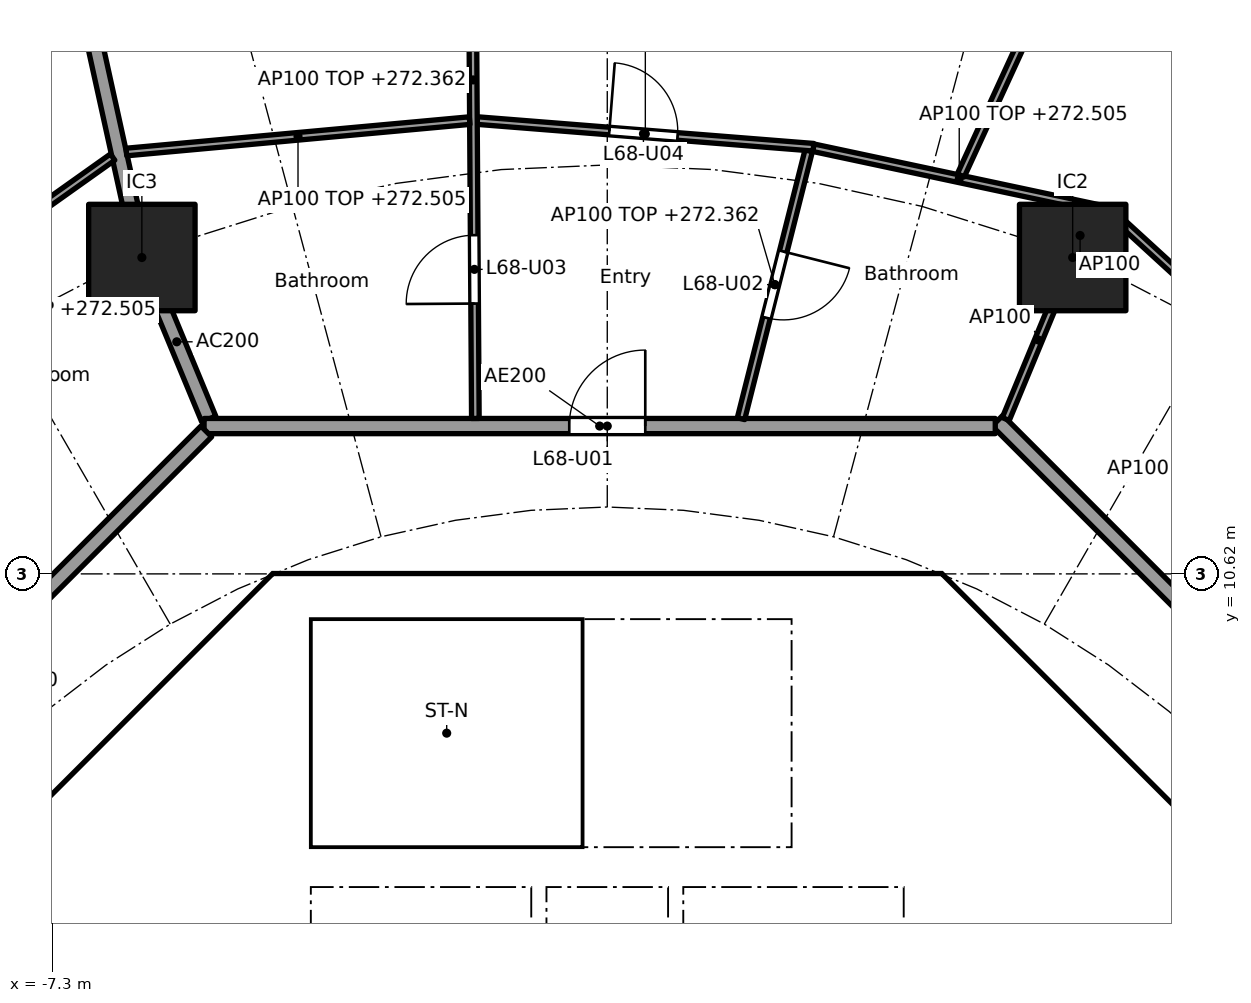
"""IFC4 building model, lengths in metres.
Left out: names, types, materials, properties, quantities, classifications, styles, units other than length and angle.
Written with IfcOpenShell. Run it as: python <this file> out.ifc"""

import sys

from ifc_helpers import new_model, si_unit, direction, frame, frame_2d, origin, origin_2d, place, context, subcontext, project, spatial, polyline, rectangle, outline, extrude, element, fill, save


model = new_model("IFC4")
c1 = context("Model", 3, precision=1e-05, world=origin(), true_north=direction((0.0, 1.0)))
c2 = subcontext(c1, "Body", "Model", "MODEL_VIEW")
j1 = project(units=[si_unit("LENGTHUNIT", "METRE"), si_unit("PLANEANGLEUNIT", "RADIAN")], contexts=[c1])
p1 = place(None, origin())
s1 = spatial("IfcSite", under=j1, at=p1, CompositionType="ELEMENT")
p2 = place(p1, origin())
s2 = spatial("IfcBuilding", under=s1, at=p2, CompositionType="ELEMENT")
p3 = place(p2, frame((0.0, 0.0, 269.6)))
s3 = spatial("IfcBuildingStorey", under=s2, at=p3, CompositionType="ELEMENT", Elevation=269.6)
for number, where, z_axis, x_axis in (
    (1, (6.123, 14.782, 0.0), (0.0, 0.0, 1.0), (1.0, 0.0, 0.0)),
    (2, (-6.123, 14.782, 0.0), (0.0, 0.0, 1.0), (1.0, 0.0, 0.0)),
):
    element("IfcColumn", number, at=place(p3, frame(where, z_axis=z_axis, x_axis=x_axis)), inside=s3, PredefinedType="COLUMN", context=c2, shape_type="SweptSolid", body=[
        extrude(rectangle(XDim=1.4, YDim=1.4, at=origin_2d()), origin(), (0.0, 0.0, 1.0), 3.7),
    ])
p4 = place(p3, frame((9.988, 4.613, 0.0), z_axis=(0.0, 0.0, 1.0), x_axis=(-0.707106781187, 0.707106781187, 0.0)))
e3 = element("IfcWall", 3, at=p4, inside=s3, PredefinedType="SHEAR", context=c2, shape_type="SweptSolid", body=[
    extrude(rectangle(XDim=7.602, YDim=0.6, at=frame_2d((3.801, 0.0))), origin(), (0.0, 0.0, 1.0), 3.44),
])
p5 = place(p4, frame((3.201, 0.0, 0.0)))
e4 = element("IfcOpeningElement", 4, at=p5, cuts=e3, PredefinedType="OPENING", context=c2, shape_type="SweptSolid", body=[
    extrude(rectangle(XDim=1.2, YDim=2.1, at=frame_2d((0.6, 1.05))), frame((0.0, 0.31, 0.0), z_axis=(0.0, -1.0, 0.0), x_axis=(1.0, 0.0, 0.0)), (0.0, 0.0, 1.0), 0.62),
])
p6 = place(p3, frame((-4.613, 9.988, 0.0), z_axis=(0.0, 0.0, 1.0), x_axis=(-0.707106781187, -0.707106781187, 0.0)))
e5 = element("IfcWall", 5, at=p6, inside=s3, PredefinedType="SHEAR", context=c2, shape_type="SweptSolid", body=[
    extrude(rectangle(XDim=7.602, YDim=0.6, at=frame_2d((3.801, 0.0))), origin(), (0.0, 0.0, 1.0), 3.44),
])
p7 = place(p6, frame((0.351, 0.0, 0.0)))
e6 = element("IfcOpeningElement", 6, at=p7, cuts=e5, PredefinedType="OPENING", context=c2, shape_type="SweptSolid", body=[
    extrude(rectangle(XDim=1.1, YDim=2.1, at=frame_2d((0.55, 1.05))), frame((0.0, 0.31, 0.0), z_axis=(0.0, -1.0, 0.0), x_axis=(1.0, 0.0, 0.0)), (0.0, 0.0, 1.0), 0.62),
])
p8 = place(p3, frame((-5.8, 4.3, 0.0), z_axis=(0.0, 0.0, 1.0), x_axis=(0.0, 1.0, 0.0)))
e7 = element("IfcWall", 7, at=p8, inside=s3, PredefinedType="PARTITIONING", context=c2, shape_type="SweptSolid", body=[
    extrude(rectangle(XDim=3.927, YDim=0.15, at=frame_2d((1.963, 0.0))), origin(), (0.0, 0.0, 1.0), 3.44),
])
p9 = place(p8, frame((0.262, 0.0, 0.0)))
e8 = element("IfcOpeningElement", 8, at=p9, cuts=e7, PredefinedType="OPENING", context=c2, shape_type="SweptSolid", body=[
    extrude(rectangle(XDim=0.9, YDim=2.1, at=frame_2d((0.45, 1.05))), frame((0.0, 0.085, 0.0), z_axis=(0.0, -1.0, 0.0), x_axis=(1.0, 0.0, 0.0)), (0.0, 0.0, 1.0), 0.17),
])
p10 = place(p8, frame((2.338, 0.0, 0.0)))
e9 = element("IfcOpeningElement", 9, at=p10, cuts=e7, PredefinedType="OPENING", context=c2, shape_type="SweptSolid", body=[
    extrude(rectangle(XDim=0.9, YDim=2.1, at=frame_2d((0.45, 1.05))), frame((0.0, 0.085, 0.0), z_axis=(0.0, -1.0, 0.0), x_axis=(1.0, 0.0, 0.0)), (0.0, 0.0, 1.0), 0.17),
])
p11 = place(p3, frame((4.0, 4.3, 0.0), z_axis=(0.0, 0.0, 1.0), x_axis=(0.0, 1.0, 0.0)))
e10 = element("IfcWall", 10, at=p11, inside=s3, PredefinedType="SOLIDWALL", context=c2, shape_type="SweptSolid", body=[
    extrude(rectangle(XDim=2.2, YDim=0.2, at=frame_2d((1.1, 0.0))), origin(), (0.0, 0.0, 1.0), 3.44),
])
p12 = place(p11, frame((0.55, 0.0, 0.0)))
e11 = element("IfcOpeningElement", 11, at=p12, cuts=e10, PredefinedType="OPENING", context=c2, shape_type="SweptSolid", body=[
    extrude(rectangle(XDim=1.1, YDim=2.1, at=frame_2d((0.55, 1.05))), frame((0.0, 0.11, 0.0), z_axis=(0.0, -1.0, 0.0), x_axis=(1.0, 0.0, 0.0)), (0.0, 0.0, 1.0), 0.22),
])
p13 = place(p3, frame((-4.0, 4.3, 0.0), z_axis=(0.0, 0.0, 1.0), x_axis=(0.0, 1.0, 0.0)))
e12 = element("IfcWall", 12, at=p13, inside=s3, PredefinedType="SOLIDWALL", context=c2, shape_type="SweptSolid", body=[
    extrude(rectangle(XDim=2.2, YDim=0.2, at=frame_2d((1.1, 0.0))), origin(), (0.0, 0.0, 1.0), 3.44),
])
p14 = place(p13, frame((0.55, 0.0, 0.0)))
e13 = element("IfcOpeningElement", 13, at=p14, cuts=e12, PredefinedType="OPENING", context=c2, shape_type="SweptSolid", body=[
    extrude(rectangle(XDim=1.1, YDim=2.1, at=frame_2d((0.55, 1.05))), frame((0.0, 0.11, 0.0), z_axis=(0.0, -1.0, 0.0), x_axis=(1.0, 0.0, 0.0)), (0.0, 0.0, 1.0), 0.22),
])
p15 = place(p3, frame((4.0, 7.025, 0.0), z_axis=(0.0, 0.0, 1.0), x_axis=(0.0, 1.0, 0.0)))
e14 = element("IfcWall", 14, at=p15, inside=s3, PredefinedType="SOLIDWALL", context=c2, shape_type="SweptSolid", body=[
    extrude(rectangle(XDim=3.0, YDim=0.2, at=frame_2d((1.5, 0.0))), origin(), (0.0, 0.0, 1.0), 3.44),
])
p16 = place(p15, frame((0.925, 0.0, 0.0)))
e15 = element("IfcOpeningElement", 15, at=p16, cuts=e14, PredefinedType="OPENING", context=c2, shape_type="SweptSolid", body=[
    extrude(rectangle(XDim=1.1, YDim=2.1, at=frame_2d((0.55, 1.05))), frame((0.0, 0.11, 0.0), z_axis=(0.0, -1.0, 0.0), x_axis=(1.0, 0.0, 0.0)), (0.0, 0.0, 1.0), 0.22),
])
p17 = place(p3, origin())
e16 = element("IfcWall", 16, at=p17, inside=s3, PredefinedType="SHEAR", context=c2, shape_type="SweptSolid", body=[
    extrude(outline(polyline([(-4.152, 10.025), (-4.401, 9.776), (-4.825, 10.2), (-4.401, 10.625), (4.401, 10.625), (4.825, 10.2), (4.401, 9.776), (4.152, 10.025), (-4.152, 10.025)])), origin(), (0.0, 0.0, 1.0), 3.44),
])
for number, where, z_axis, x_axis in (
    (17, (-0.9, 4.3, 0.0), (0.0, 0.0, 1.0), (0.0, 1.0, 0.0)),
    (18, (0.9, 4.3, 0.0), (0.0, 0.0, 1.0), (0.0, 1.0, 0.0)),
):
    element("IfcWall", number, at=place(p3, frame(where, z_axis=z_axis, x_axis=x_axis)), inside=s3, PredefinedType="SOLIDWALL", context=c2, shape_type="SweptSolid", body=[
        extrude(rectangle(XDim=2.2, YDim=0.2, at=frame_2d((1.1, 0.0))), origin(), (0.0, 0.0, 1.0), 3.44),
    ])
p18 = place(p3, origin())
e19 = element("IfcWall", 19, at=p18, inside=s3, PredefinedType="SOLIDWALL", context=c2, shape_type="SweptSolid", body=[
    extrude(outline(polyline([(-3.9, 7.025), (-4.1, 7.025), (-4.1, 10.025), (-3.9, 10.025), (-3.9, 7.025)])), origin(), (0.0, 0.0, 1.0), 3.44),
])
p19 = place(p3, origin())
e20 = element("IfcWall", 20, at=p19, inside=s3, PredefinedType="SOLIDWALL", context=c2, shape_type="SweptSolid", body=[
    extrude(outline(polyline([(4.1, 6.5), (-4.1, 6.5), (-4.1, 7.025), (4.1, 7.025), (4.1, 6.5)])), origin(), (0.0, 0.0, 1.0), 3.44),
])
p20 = place(p3, frame((-5.243, 12.657, 0.0), z_axis=(0.0, 0.0, 1.0), x_axis=(-0.38273085373, 0.923859888513, 0.0)))
e21 = element("IfcWall", 21, at=p20, inside=s3, PredefinedType="PARTITIONING", context=c2, shape_type="SweptSolid", body=[
    extrude(rectangle(XDim=2.199, YDim=0.2, at=frame_2d((1.1, 0.0))), origin(), (0.0, 0.0, 1.0), 3.44),
])
p21 = place(p3, frame((-6.134, 14.831, 0.0), z_axis=(0.0, 0.0, 1.0), x_axis=(-0.214842475666, 0.976648714047, 0.0)))
e22 = element("IfcWall", 22, at=p21, inside=s3, PredefinedType="PARTITIONING", context=c2, shape_type="SweptSolid", body=[
    extrude(rectangle(XDim=6.031, YDim=0.2, at=frame_2d((3.015, 0.0))), origin(), (0.0, 0.0, 1.0), 2.905),
])
p22 = place(p3, frame((12.635, 5.134, 0.0), z_axis=(0.0, 0.0, 1.0), x_axis=(-0.707106781187, 0.707106781187, 0.0)))
e23 = element("IfcWall", 23, at=p22, inside=s3, PredefinedType="PARTITIONING", context=c2, shape_type="SweptSolid", body=[
    extrude(rectangle(XDim=10.609, YDim=0.2, at=frame_2d((5.305, 0.0))), origin(), (0.0, 0.0, 1.0), 3.44),
])
p23 = place(p3, frame((5.104, 12.565, 0.0), z_axis=(0.0, 0.0, 1.0), x_axis=(-1.0, 0.0, 0.0)))
e24 = element("IfcWall", 24, at=p23, inside=s3, PredefinedType="PARTITIONING", context=c2, shape_type="SweptSolid", body=[
    extrude(rectangle(XDim=10.409, YDim=0.2, at=frame_2d((5.205, 0.0))), origin(), (0.0, 0.0, 1.0), 3.44),
])
p24 = place(p23, frame((4.604, 0.0, 0.0)))
e25 = element("IfcOpeningElement", 25, at=p24, cuts=e24, PredefinedType="OPENING", context=c2, shape_type="SweptSolid", body=[
    extrude(rectangle(XDim=1.0, YDim=2.1, at=frame_2d((0.5, 1.05))), frame((0.0, 0.11, 0.0), z_axis=(0.0, -1.0, 0.0), x_axis=(1.0, 0.0, 0.0)), (0.0, 0.0, 1.0), 0.22),
])
p25 = place(p3, frame((-5.275, 12.494, 0.0), z_axis=(0.0, 0.0, 1.0), x_axis=(-0.707106781187, -0.707106781187, 0.0)))
e26 = element("IfcWall", 26, at=p25, inside=s3, PredefinedType="PARTITIONING", context=c2, shape_type="SweptSolid", body=[
    extrude(rectangle(XDim=10.209, YDim=0.2, at=frame_2d((5.104, 0.0))), origin(), (0.0, 0.0, 1.0), 3.44),
])
p26 = place(p25, frame((4.604, 0.0, 0.0)))
e27 = element("IfcOpeningElement", 27, at=p26, cuts=e26, PredefinedType="OPENING", context=c2, shape_type="SweptSolid", body=[
    extrude(rectangle(XDim=1.0, YDim=2.1, at=frame_2d((0.5, 1.05))), frame((0.0, 0.11, 0.0), z_axis=(0.0, -1.0, 0.0), x_axis=(1.0, 0.0, 0.0)), (0.0, 0.0, 1.0), 0.22),
])
p27 = place(p3, frame((10.972, 11.398, 0.0), z_axis=(0.0, 0.0, 1.0), x_axis=(-0.737838738013, 0.674977034193, 0.0)))
e28 = element("IfcWall", 28, at=p27, inside=s3, PredefinedType="PARTITIONING", context=c2, shape_type="SweptSolid", body=[
    extrude(rectangle(XDim=5.977, YDim=0.1, at=frame_2d((2.989, 0.0))), origin(), (0.0, 0.0, 1.0), 2.905),
])
p28 = place(p27, frame((2.514, 0.0, 0.0)))
e29 = element("IfcOpeningElement", 29, at=p28, cuts=e28, PredefinedType="OPENING", context=c2, shape_type="SweptSolid", body=[
    extrude(rectangle(XDim=0.9, YDim=2.1, at=frame_2d((0.45, 1.05))), frame((0.0, 0.06, 0.0), z_axis=(0.0, -1.0, 0.0), x_axis=(1.0, 0.0, 0.0)), (0.0, 0.0, 1.0), 0.12),
])
p29 = place(p3, frame((5.243, 12.657, 0.0), z_axis=(0.0, 0.0, 1.0), x_axis=(0.382719158442, 0.923864733477, 0.0)))
e30 = element("IfcWall", 30, at=p29, inside=s3, PredefinedType="PARTITIONING", context=c2, shape_type="SweptSolid", body=[
    extrude(rectangle(XDim=2.25, YDim=0.1, at=frame_2d((1.125, 0.0))), origin(), (0.0, 0.0, 1.0), 3.44),
])
p30 = place(p3, frame((6.55, 15.409, 0.0), z_axis=(0.0, 0.0, 1.0), x_axis=(-0.978051195976, 0.208364723621, 0.0)))
e31 = element("IfcWall", 31, at=p30, inside=s3, PredefinedType="PARTITIONING", context=c2, shape_type="SweptSolid", body=[
    extrude(rectangle(XDim=3.924, YDim=0.1, at=frame_2d((1.962, 0.0))), origin(), (0.0, 0.0, 1.0), 2.905),
])
p31 = place(p3, frame((4.651, 15.863, 0.0), z_axis=(0.0, 0.0, 1.0), x_axis=(0.41744196735, 0.908703584176, 0.0)))
e32 = element("IfcWall", 32, at=p31, inside=s3, PredefinedType="PARTITIONING", context=c2, shape_type="SweptSolid", body=[
    extrude(rectangle(XDim=5.242, YDim=0.1, at=frame_2d((2.621, 0.0))), origin(), (0.0, 0.0, 1.0), 2.983),
])
p32 = place(p31, frame((2.171, 0.0, 0.0)))
e33 = element("IfcOpeningElement", 33, at=p32, cuts=e32, PredefinedType="OPENING", context=c2, shape_type="SweptSolid", body=[
    extrude(rectangle(XDim=0.9, YDim=2.1, at=frame_2d((0.45, 1.05))), frame((0.0, 0.06, 0.0), z_axis=(0.0, -1.0, 0.0), x_axis=(1.0, 0.0, 0.0)), (0.0, 0.0, 1.0), 0.12),
])
p33 = place(p3, frame((1.759, 12.662, 0.0), z_axis=(0.0, 0.0, 1.0), x_axis=(0.244966765147, 0.969531476525, 0.0)))
e34 = element("IfcWall", 34, at=p33, inside=s3, PredefinedType="PARTITIONING", context=c2, shape_type="SweptSolid", body=[
    extrude(rectangle(XDim=3.638, YDim=0.1, at=frame_2d((1.819, 0.0))), origin(), (0.0, 0.0, 1.0), 2.762),
])
p34 = place(p33, frame((1.369, 0.0, 0.0)))
e35 = element("IfcOpeningElement", 35, at=p34, cuts=e34, PredefinedType="OPENING", context=c2, shape_type="SweptSolid", body=[
    extrude(rectangle(XDim=0.9, YDim=2.1, at=frame_2d((0.45, 1.05))), frame((0.0, 0.06, 0.0), z_axis=(0.0, -1.0, 0.0), x_axis=(1.0, 0.0, 0.0)), (0.0, 0.0, 1.0), 0.12),
])
p35 = place(p3, frame((2.713, 16.233, 0.0), z_axis=(0.0, 0.0, 1.0), x_axis=(-0.996870142942, 0.079056423588, 0.0)))
e36 = element("IfcWall", 36, at=p35, inside=s3, PredefinedType="PARTITIONING", context=c2, shape_type="SweptSolid", body=[
    extrude(rectangle(XDim=4.438, YDim=0.1, at=frame_2d((2.219, 0.0))), origin(), (0.0, 0.0, 1.0), 2.905),
])
p36 = place(p35, frame((1.794, 0.0, 0.0)))
e37 = element("IfcOpeningElement", 37, at=p36, cuts=e36, PredefinedType="OPENING", context=c2, shape_type="SweptSolid", body=[
    extrude(rectangle(XDim=0.9, YDim=2.1, at=frame_2d((0.45, 1.05))), frame((0.0, 0.06, 0.0), z_axis=(0.0, -1.0, 0.0), x_axis=(1.0, 0.0, 0.0)), (0.0, 0.0, 1.0), 0.12),
])
p37 = place(p3, frame((-1.736, 12.665, 0.0), z_axis=(0.0, 0.0, 1.0), x_axis=(-0.00646827636, 0.999979080482, 0.0)))
e38 = element("IfcWall", 38, at=p37, inside=s3, PredefinedType="PARTITIONING", context=c2, shape_type="SweptSolid", body=[
    extrude(rectangle(XDim=8.908, YDim=0.1, at=frame_2d((4.454, 0.0))), origin(), (0.0, 0.0, 1.0), 2.762),
])
p38 = place(p37, frame((1.512, 0.0, 0.0)))
e39 = element("IfcOpeningElement", 39, at=p38, cuts=e38, PredefinedType="OPENING", context=c2, shape_type="SweptSolid", body=[
    extrude(rectangle(XDim=0.9, YDim=2.1, at=frame_2d((0.45, 1.05))), frame((0.0, 0.06, 0.0), z_axis=(0.0, -1.0, 0.0), x_axis=(1.0, 0.0, 0.0)), (0.0, 0.0, 1.0), 0.12),
])
p39 = place(p37, frame((5.965, 0.0, 0.0)))
e40 = element("IfcOpeningElement", 40, at=p39, cuts=e38, PredefinedType="OPENING", context=c2, shape_type="SweptSolid", body=[
    extrude(rectangle(XDim=0.9, YDim=2.1, at=frame_2d((0.45, 1.05))), frame((0.0, 0.06, 0.0), z_axis=(0.0, -1.0, 0.0), x_axis=(1.0, 0.0, 0.0)), (0.0, 0.0, 1.0), 0.12),
])
p40 = place(p3, frame((-1.811, 16.583, 0.0), z_axis=(0.0, 0.0, 1.0), x_axis=(-0.995842301034, -0.091093970555, 0.0)))
e41 = element("IfcWall", 41, at=p40, inside=s3, PredefinedType="PARTITIONING", context=c2, shape_type="SweptSolid", body=[
    extrude(rectangle(XDim=4.535, YDim=0.1, at=frame_2d((2.267, 0.0))), origin(), (0.0, 0.0, 1.0), 2.905),
])
p41 = place(p3, frame((-6.508, 16.103, 0.0), z_axis=(0.0, 0.0, 1.0), x_axis=(-0.815202203556, -0.579176456114, 0.0)))
e42 = element("IfcWall", 42, at=p41, inside=s3, PredefinedType="PARTITIONING", context=c2, shape_type="SweptSolid", body=[
    extrude(rectangle(XDim=4.036, YDim=0.1, at=frame_2d((2.018, 0.0))), origin(), (0.0, 0.0, 1.0), 2.905),
])
p42 = place(p3, frame((6.388, 15.29, 0.0), z_axis=(0.0, 0.0, 1.0), x_axis=(-0.610612392422, -0.791929609385, 0.0)))
e43 = element("IfcWall", 43, at=p42, inside=s3, PredefinedType="PARTITIONING", context=c2, shape_type="SweptSolid", body=[
    extrude(rectangle(XDim=0.549, YDim=0.1, at=frame_2d((0.275, 0.0))), origin(), (0.0, 0.0, 1.0), 3.44),
])
p43 = place(p16, origin())
e44 = element("IfcDoor", 44, at=p43, inside=s3, OperationType="SINGLE_SWING_RIGHT", PredefinedType="DOOR", context=c2, shape_type="SweptSolid", body=[
    extrude(rectangle(XDim=1.1, YDim=2.1, at=frame_2d((0.55, 1.05))), frame((0.0, 0.025, 0.0), z_axis=(0.0, -1.0, 0.0), x_axis=(1.0, 0.0, 0.0)), (0.0, 0.0, 1.0), 0.05),
])
fill(e15, e44)
p44 = place(p10, origin())
e45 = element("IfcDoor", 45, at=p44, inside=s3, OperationType="SINGLE_SWING_LEFT", PredefinedType="DOOR", context=c2, shape_type="SweptSolid", body=[
    extrude(rectangle(XDim=0.9, YDim=2.1, at=frame_2d((0.45, 1.05))), frame((0.0, 0.025, 0.0), z_axis=(0.0, -1.0, 0.0), x_axis=(1.0, 0.0, 0.0)), (0.0, 0.0, 1.0), 0.05),
])
fill(e9, e45)
p45 = place(p5, origin())
e46 = element("IfcDoor", 46, at=p45, inside=s3, OperationType="SINGLE_SWING_RIGHT", PredefinedType="DOOR", context=c2, shape_type="SweptSolid", body=[
    extrude(rectangle(XDim=1.2, YDim=2.1, at=frame_2d((0.6, 1.05))), frame((0.0, 0.025, 0.0), z_axis=(0.0, -1.0, 0.0), x_axis=(1.0, 0.0, 0.0)), (0.0, 0.0, 1.0), 0.05),
])
fill(e4, e46)
p46 = place(p7, origin())
e47 = element("IfcDoor", 47, at=p46, inside=s3, OperationType="SINGLE_SWING_RIGHT", PredefinedType="DOOR", context=c2, shape_type="SweptSolid", body=[
    extrude(rectangle(XDim=1.1, YDim=2.1, at=frame_2d((0.55, 1.05))), frame((0.0, 0.025, 0.0), z_axis=(0.0, -1.0, 0.0), x_axis=(1.0, 0.0, 0.0)), (0.0, 0.0, 1.0), 0.05),
])
fill(e6, e47)
p47 = place(p24, frame((1.0, 0.0, 0.0), x_axis=(-1.0, 0.0, 0.0)))
e48 = element("IfcDoor", 48, at=p47, inside=s3, OperationType="SINGLE_SWING_RIGHT", PredefinedType="DOOR", context=c2, shape_type="SweptSolid", body=[
    extrude(rectangle(XDim=1.0, YDim=2.1, at=frame_2d((0.5, 1.05))), frame((0.0, 0.025, 0.0), z_axis=(0.0, -1.0, 0.0), x_axis=(1.0, 0.0, 0.0)), (0.0, 0.0, 1.0), 0.05),
])
fill(e25, e48)
p48 = place(p34, frame((0.9, 0.0, 0.0), x_axis=(-1.0, 0.0, 0.0)))
e49 = element("IfcDoor", 49, at=p48, inside=s3, OperationType="SINGLE_SWING_LEFT", PredefinedType="DOOR", context=c2, shape_type="SweptSolid", body=[
    extrude(rectangle(XDim=0.9, YDim=2.1, at=frame_2d((0.45, 1.05))), frame((0.0, 0.025, 0.0), z_axis=(0.0, -1.0, 0.0), x_axis=(1.0, 0.0, 0.0)), (0.0, 0.0, 1.0), 0.05),
])
fill(e35, e49)
p49 = place(p38, origin())
e50 = element("IfcDoor", 50, at=p49, inside=s3, OperationType="SINGLE_SWING_LEFT", PredefinedType="DOOR", context=c2, shape_type="SweptSolid", body=[
    extrude(rectangle(XDim=0.9, YDim=2.1, at=frame_2d((0.45, 1.05))), frame((0.0, 0.025, 0.0), z_axis=(0.0, -1.0, 0.0), x_axis=(1.0, 0.0, 0.0)), (0.0, 0.0, 1.0), 0.05),
])
fill(e39, e50)
p50 = place(p36, frame((0.9, 0.0, 0.0), x_axis=(-1.0, 0.0, 0.0)))
e51 = element("IfcDoor", 51, at=p50, inside=s3, OperationType="SINGLE_SWING_LEFT", PredefinedType="DOOR", context=c2, shape_type="SweptSolid", body=[
    extrude(rectangle(XDim=0.9, YDim=2.1, at=frame_2d((0.45, 1.05))), frame((0.0, 0.025, 0.0), z_axis=(0.0, -1.0, 0.0), x_axis=(1.0, 0.0, 0.0)), (0.0, 0.0, 1.0), 0.05),
])
fill(e37, e51)
save(model, sys.argv[1])
